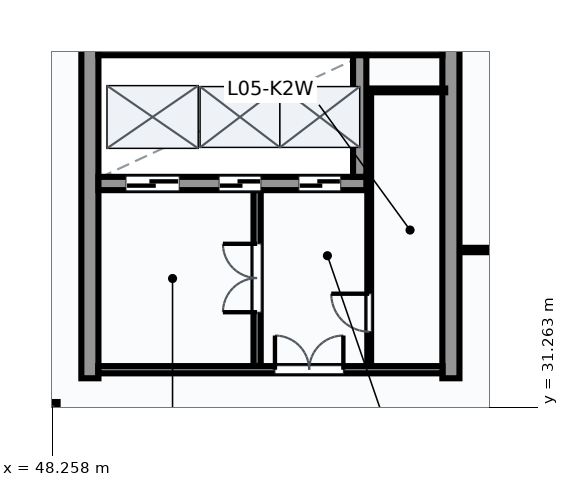
"""IFC4 building model, lengths in metres.
Left out: names, types, materials, properties, quantities, classifications, styles, units other than length and angle.
Written with IfcOpenShell. Run it as: python <this file> out.ifc"""

import sys

from ifc_helpers import new_model, si_unit, direction, frame, frame_2d, origin, origin_2d, place, context, subcontext, project, spatial, rectangle, circle, extrude, element, fill, save


model = new_model("IFC4")
c1 = context("Model", 3, precision=1e-05, world=origin(), true_north=direction((0.0, 1.0)))
c2 = subcontext(c1, "Body", "Model", "MODEL_VIEW")
j1 = project(units=[si_unit("LENGTHUNIT", "METRE"), si_unit("PLANEANGLEUNIT", "RADIAN")], contexts=[c1])
p1 = place(None, origin())
s1 = spatial("IfcSite", under=j1, at=p1, CompositionType="ELEMENT")
p2 = place(p1, origin())
s2 = spatial("IfcBuilding", under=s1, at=p2, CompositionType="ELEMENT")
p3 = place(p2, frame((0.0, 0.0, 24.6)))
s3 = spatial("IfcBuildingStorey", under=s2, at=p3, CompositionType="ELEMENT", Elevation=24.6)
p4 = place(p3, frame((48.0, 31.0, 0.0), z_axis=(0.0, 0.0, 1.0), x_axis=(1.0, 0.0, 0.0)))
e1 = element("IfcColumn", 1, at=p4, inside=s3, PredefinedType="COLUMN", context=c2, shape_type="SweptSolid", body=[
    extrude(circle(Radius=0.4, at=origin_2d()), origin(), (0.0, 0.0, 1.0), 4.8),
])
for number, where, z_axis, x_axis in (
    (2, (49.25, 32.025, 0.0), (0.0, 0.0, 1.0), (0.0, 1.0, 0.0)),
    (3, (58.75, 32.025, 0.0), (0.0, 0.0, 1.0), (0.0, 1.0, 0.0)),
):
    element("IfcWall", number, at=place(p3, frame(where, z_axis=z_axis, x_axis=x_axis)), inside=s3, PredefinedType="SHEAR", context=c2, shape_type="SweptSolid", body=[
        extrude(rectangle(XDim=8.95, YDim=0.45, at=frame_2d((4.475, 0.0))), origin(), (0.0, 0.0, 1.0), 4.8),
    ])
p5 = place(p3, frame((49.475, 40.75, 0.0), z_axis=(0.0, 0.0, 1.0), x_axis=(1.0, 0.0, 0.0)))
e4 = element("IfcWall", 4, at=p5, inside=s3, PredefinedType="SHEAR", context=c2, shape_type="SweptSolid", body=[
    extrude(rectangle(XDim=9.05, YDim=0.45, at=frame_2d((4.525, 0.0))), origin(), (0.0, 0.0, 1.0), 4.8),
])
p6 = place(p3, frame((49.475, 37.15, 0.0), z_axis=(0.0, 0.0, 1.0), x_axis=(1.0, 0.0, 0.0)))
e5 = element("IfcWall", 5, at=p6, inside=s3, PredefinedType="SHEAR", context=c2, shape_type="SweptSolid", body=[
    extrude(rectangle(XDim=7.05, YDim=0.35, at=frame_2d((3.525, 0.0))), origin(), (0.0, 0.0, 1.0), 4.8),
])
p7 = place(p6, frame((0.725, 0.0, 0.0)))
e6 = element("IfcOpeningElement", 6, at=p7, cuts=e5, PredefinedType="OPENING", context=c2, shape_type="SweptSolid", body=[
    extrude(rectangle(XDim=1.4, YDim=2.3, at=frame_2d((0.7, 1.15))), frame((0.0, 0.185, 0.0), z_axis=(0.0, -1.0, 0.0), x_axis=(1.0, 0.0, 0.0)), (0.0, 0.0, 1.0), 0.37),
])
p8 = place(p6, frame((3.175, 0.0, 0.0)))
e7 = element("IfcOpeningElement", 7, at=p8, cuts=e5, PredefinedType="OPENING", context=c2, shape_type="SweptSolid", body=[
    extrude(rectangle(XDim=1.1, YDim=2.2, at=frame_2d((0.55, 1.1))), frame((0.0, 0.185, 0.0), z_axis=(0.0, -1.0, 0.0), x_axis=(1.0, 0.0, 0.0)), (0.0, 0.0, 1.0), 0.37),
])
p9 = place(p6, frame((5.275, 0.0, 0.0)))
e8 = element("IfcOpeningElement", 8, at=p9, cuts=e5, PredefinedType="OPENING", context=c2, shape_type="SweptSolid", body=[
    extrude(rectangle(XDim=1.1, YDim=2.2, at=frame_2d((0.55, 1.1))), frame((0.0, 0.185, 0.0), z_axis=(0.0, -1.0, 0.0), x_axis=(1.0, 0.0, 0.0)), (0.0, 0.0, 1.0), 0.37),
])
p10 = place(p3, frame((56.35, 37.325, 0.0), z_axis=(0.0, 0.0, 1.0), x_axis=(0.0, 1.0, 0.0)))
e9 = element("IfcWall", 9, at=p10, inside=s3, PredefinedType="SHEAR", context=c2, shape_type="SweptSolid", body=[
    extrude(rectangle(XDim=3.2, YDim=0.35, at=frame_2d((1.6, 0.0))), origin(), (0.0, 0.0, 1.0), 4.8),
])
p11 = place(p3, frame((49.47, 32.25, 0.0), z_axis=(0.0, 0.0, 1.0), x_axis=(1.0, 0.0, 0.0)))
e10 = element("IfcWall", 10, at=p11, inside=s3, PredefinedType="PARTITIONING", context=c2, shape_type="SweptSolid", body=[
    extrude(rectangle(XDim=9.06, YDim=0.19, at=frame_2d((4.53, 0.0))), origin(), (0.0, 0.0, 1.0), 4.58),
])
p12 = place(p11, frame((4.65, 0.0, 0.0)))
e11 = element("IfcOpeningElement", 11, at=p12, cuts=e10, PredefinedType="OPENING", context=c2, shape_type="SweptSolid", body=[
    extrude(rectangle(XDim=1.8, YDim=2.3, at=frame_2d((0.9, 1.15))), frame((0.0, 0.105, 0.0), z_axis=(0.0, -1.0, 0.0), x_axis=(1.0, 0.0, 0.0)), (0.0, 0.0, 1.0), 0.21),
])
p13 = place(p3, frame((53.65, 32.35, 0.0), z_axis=(0.0, 0.0, 1.0), x_axis=(0.0, 1.0, 0.0)))
e12 = element("IfcWall", 12, at=p13, inside=s3, PredefinedType="PARTITIONING", context=c2, shape_type="SweptSolid", body=[
    extrude(rectangle(XDim=4.625, YDim=0.19, at=frame_2d((2.312, 0.0))), origin(), (0.0, 0.0, 1.0), 4.58),
])
p14 = place(p13, frame((1.413, 0.0, 0.0)))
e13 = element("IfcOpeningElement", 13, at=p14, cuts=e12, PredefinedType="OPENING", context=c2, shape_type="SweptSolid", body=[
    extrude(rectangle(XDim=1.8, YDim=2.2, at=frame_2d((0.9, 1.1))), frame((0.0, 0.105, 0.0), z_axis=(0.0, -1.0, 0.0), x_axis=(1.0, 0.0, 0.0)), (0.0, 0.0, 1.0), 0.21),
])
p15 = place(p3, frame((56.6, 32.35, 0.0), z_axis=(0.0, 0.0, 1.0), x_axis=(0.0, 1.0, 0.0)))
e14 = element("IfcWall", 14, at=p15, inside=s3, PredefinedType="PARTITIONING", context=c2, shape_type="SweptSolid", body=[
    extrude(rectangle(XDim=7.25, YDim=0.1, at=frame_2d((3.625, 0.0))), origin(), (0.0, 0.0, 1.0), 4.58),
])
p16 = place(p15, frame((0.9, 0.0, 0.0)))
e15 = element("IfcOpeningElement", 15, at=p16, cuts=e14, PredefinedType="OPENING", context=c2, shape_type="SweptSolid", body=[
    extrude(rectangle(XDim=1.0, YDim=2.1, at=frame_2d((0.5, 1.05))), frame((0.0, 0.06, 0.0), z_axis=(0.0, -1.0, 0.0), x_axis=(1.0, 0.0, 0.0)), (0.0, 0.0, 1.0), 0.12),
])
p17 = place(p3, frame((56.6, 39.6, 0.0), z_axis=(0.0, 0.0, 1.0), x_axis=(1.0, 0.0, 0.0)))
e16 = element("IfcWall", 16, at=p17, inside=s3, PredefinedType="PARTITIONING", context=c2, shape_type="SweptSolid", body=[
    extrude(rectangle(XDim=2.0, YDim=0.1, at=frame_2d((1.0, 0.0))), origin(), (0.0, 0.0, 1.0), 4.58),
])
p18 = place(p3, frame((59.0, 35.4, 0.0), z_axis=(0.0, 0.0, 1.0), x_axis=(1.0, 0.0, 0.0)))
e17 = element("IfcWall", 17, at=p18, inside=s3, PredefinedType="PARTITIONING", context=c2, shape_type="SweptSolid", body=[
    extrude(rectangle(XDim=19.0, YDim=0.115, at=frame_2d((9.5, 0.0))), origin(), (0.0, 0.0, 1.0), 4.58),
])
p19 = place(p7, origin())
e18 = element("IfcDoor", 18, at=p19, inside=s3, OperationType="SLIDING_TO_LEFT", PredefinedType="DOOR", context=c2, shape_type="SweptSolid", body=[
    extrude(rectangle(XDim=1.4, YDim=2.3, at=frame_2d((0.7, 1.15))), frame((0.0, 0.025, 0.0), z_axis=(0.0, -1.0, 0.0), x_axis=(1.0, 0.0, 0.0)), (0.0, 0.0, 1.0), 0.05),
])
fill(e6, e18)
p20 = place(p8, origin())
e19 = element("IfcDoor", 19, at=p20, inside=s3, OperationType="SLIDING_TO_LEFT", PredefinedType="DOOR", context=c2, shape_type="SweptSolid", body=[
    extrude(rectangle(XDim=1.1, YDim=2.2, at=frame_2d((0.55, 1.1))), frame((0.0, 0.025, 0.0), z_axis=(0.0, -1.0, 0.0), x_axis=(1.0, 0.0, 0.0)), (0.0, 0.0, 1.0), 0.05),
])
fill(e7, e19)
p21 = place(p9, origin())
e20 = element("IfcDoor", 20, at=p21, inside=s3, OperationType="SLIDING_TO_LEFT", PredefinedType="DOOR", context=c2, shape_type="SweptSolid", body=[
    extrude(rectangle(XDim=1.1, YDim=2.2, at=frame_2d((0.55, 1.1))), frame((0.0, 0.025, 0.0), z_axis=(0.0, -1.0, 0.0), x_axis=(1.0, 0.0, 0.0)), (0.0, 0.0, 1.0), 0.05),
])
fill(e8, e20)
p22 = place(p12, origin())
e21 = element("IfcDoor", 21, at=p22, inside=s3, OperationType="DOUBLE_DOOR_SINGLE_SWING", PredefinedType="DOOR", context=c2, shape_type="SweptSolid", body=[
    extrude(rectangle(XDim=1.8, YDim=2.3, at=frame_2d((0.9, 1.15))), frame((0.0, 0.025, 0.0), z_axis=(0.0, -1.0, 0.0), x_axis=(1.0, 0.0, 0.0)), (0.0, 0.0, 1.0), 0.05),
])
fill(e11, e21)
p23 = place(p14, origin())
e22 = element("IfcDoor", 22, at=p23, inside=s3, OperationType="DOUBLE_DOOR_SINGLE_SWING", PredefinedType="DOOR", context=c2, shape_type="SweptSolid", body=[
    extrude(rectangle(XDim=1.8, YDim=2.2, at=frame_2d((0.9, 1.1))), frame((0.0, 0.025, 0.0), z_axis=(0.0, -1.0, 0.0), x_axis=(1.0, 0.0, 0.0)), (0.0, 0.0, 1.0), 0.05),
])
fill(e13, e22)
p24 = place(p16, origin())
e23 = element("IfcDoor", 23, at=p24, inside=s3, OperationType="SINGLE_SWING_RIGHT", PredefinedType="DOOR", context=c2, shape_type="SweptSolid", body=[
    extrude(rectangle(XDim=1.0, YDim=2.1, at=frame_2d((0.5, 1.05))), frame((0.0, 0.025, 0.0), z_axis=(0.0, -1.0, 0.0), x_axis=(1.0, 0.0, 0.0)), (0.0, 0.0, 1.0), 0.05),
])
fill(e15, e23)
save(model, sys.argv[1])
